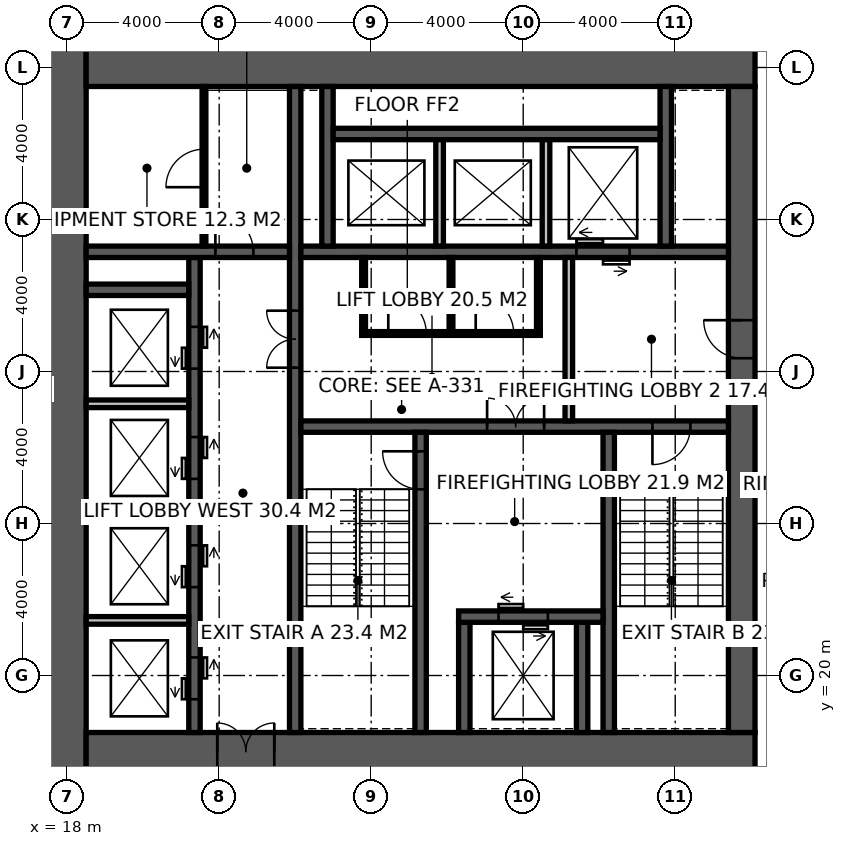
"""IFC4 building model, lengths in metres.
Left out: names, types, materials, properties, quantities, classifications, styles, units other than length and angle.
Written with IfcOpenShell. Run it as: python <this file> out.ifc"""

import sys

from ifc_helpers import new_model, si_unit, direction, frame, frame_2d, origin, place, context, subcontext, project, spatial, rectangle, extrude, element, fill, save


model = new_model("IFC4")
c1 = context("Model", 3, precision=1e-05, world=origin(), true_north=direction((0.0, 1.0)))
c2 = subcontext(c1, "Body", "Model", "MODEL_VIEW")
j1 = project(units=[si_unit("LENGTHUNIT", "METRE"), si_unit("PLANEANGLEUNIT", "RADIAN")], contexts=[c1])
p1 = place(None, origin())
s1 = spatial("IfcSite", under=j1, at=p1, CompositionType="ELEMENT")
p2 = place(p1, origin())
s2 = spatial("IfcBuilding", under=s1, at=p2, CompositionType="ELEMENT")
p3 = place(p2, frame((0.0, 0.0, 175.8)))
s3 = spatial("IfcBuildingStorey", under=s2, at=p3, CompositionType="ELEMENT", Elevation=175.8)
p4 = place(p3, frame((18.0, 17.5, -0.15), z_axis=(0.0, 0.0, 1.0), x_axis=(0.0, 1.0, 0.0)))
e1 = element("IfcWall", 1, at=p4, inside=s3, PredefinedType="SHEAR", context=c2, shape_type="SweptSolid", body=[
    extrude(rectangle(XDim=19.0, YDim=1.0, at=frame_2d((9.5, 0.0))), origin(), (0.0, 0.0, 1.0), 4.0),
])
p5 = place(p3, frame((18.5, 18.0, -0.15), z_axis=(0.0, 0.0, 1.0), x_axis=(1.0, 0.0, 0.0)))
e2 = element("IfcWall", 2, at=p5, inside=s3, PredefinedType="SHEAR", context=c2, shape_type="SweptSolid", body=[
    extrude(rectangle(XDim=17.6, YDim=1.0, at=frame_2d((8.8, 0.0))), origin(), (0.0, 0.0, 1.0), 4.0),
])
p6 = place(p5, frame((3.45, 0.0, 0.15)))
e3 = element("IfcOpeningElement", 3, at=p6, cuts=e2, PredefinedType="OPENING", context=c2, shape_type="SweptSolid", body=[
    extrude(rectangle(XDim=1.5, YDim=2.4, at=frame_2d((0.75, 1.2))), frame((0.0, 0.51, 0.0), z_axis=(0.0, -1.0, 0.0), x_axis=(1.0, 0.0, 0.0)), (0.0, 0.0, 1.0), 1.02),
])
p7 = place(p3, frame((18.5, 36.0, -0.15), z_axis=(0.0, 0.0, 1.0), x_axis=(1.0, 0.0, 0.0)))
e4 = element("IfcWall", 4, at=p7, inside=s3, PredefinedType="SHEAR", context=c2, shape_type="SweptSolid", body=[
    extrude(rectangle(XDim=17.6, YDim=1.0, at=frame_2d((8.8, 0.0))), origin(), (0.0, 0.0, 1.0), 4.0),
])
p8 = place(p3, frame((35.75, 18.5, -0.15), z_axis=(0.0, 0.0, 1.0), x_axis=(0.0, 1.0, 0.0)))
e5 = element("IfcWall", 5, at=p8, inside=s3, PredefinedType="SHEAR", context=c2, shape_type="SweptSolid", body=[
    extrude(rectangle(XDim=17.0, YDim=0.7, at=frame_2d((8.5, 0.0))), origin(), (0.0, 0.0, 1.0), 4.0),
])
p9 = place(p8, frame((9.85, 0.0, 0.15)))
e6 = element("IfcOpeningElement", 6, at=p9, cuts=e5, PredefinedType="OPENING", context=c2, shape_type="SweptSolid", body=[
    extrude(rectangle(XDim=1.0, YDim=2.2, at=frame_2d((0.5, 1.1))), frame((0.0, 0.36, 0.0), z_axis=(0.0, -1.0, 0.0), x_axis=(1.0, 0.0, 0.0)), (0.0, 0.0, 1.0), 0.72),
])
p10 = place(p3, frame((24.0, 18.5, -0.15), z_axis=(0.0, 0.0, 1.0), x_axis=(0.0, 1.0, 0.0)))
e7 = element("IfcWall", 7, at=p10, inside=s3, PredefinedType="SHEAR", context=c2, shape_type="SweptSolid", body=[
    extrude(rectangle(XDim=17.0, YDim=0.3, at=frame_2d((8.5, 0.0))), origin(), (0.0, 0.0, 1.0), 4.0),
])
p11 = place(p10, frame((9.6, 0.0, 0.15)))
e8 = element("IfcOpeningElement", 8, at=p11, cuts=e7, PredefinedType="OPENING", context=c2, shape_type="SweptSolid", body=[
    extrude(rectangle(XDim=1.5, YDim=2.4, at=frame_2d((0.75, 1.2))), frame((0.0, 0.16, 0.0), z_axis=(0.0, -1.0, 0.0), x_axis=(1.0, 0.0, 0.0)), (0.0, 0.0, 1.0), 0.32),
])
p12 = place(p3, frame((24.15, 26.55, -0.15), z_axis=(0.0, 0.0, 1.0), x_axis=(1.0, 0.0, 0.0)))
e9 = element("IfcWall", 9, at=p12, inside=s3, PredefinedType="SHEAR", context=c2, shape_type="SweptSolid", body=[
    extrude(rectangle(XDim=11.25, YDim=0.3, at=frame_2d((5.625, 0.0))), origin(), (0.0, 0.0, 1.0), 4.0),
])
p13 = place(p12, frame((9.25, 0.0, 0.15)))
e10 = element("IfcOpeningElement", 10, at=p13, cuts=e9, PredefinedType="OPENING", context=c2, shape_type="SweptSolid", body=[
    extrude(rectangle(XDim=1.0, YDim=2.2, at=frame_2d((0.5, 1.1))), frame((0.0, 0.16, 0.0), z_axis=(0.0, -1.0, 0.0), x_axis=(1.0, 0.0, 0.0)), (0.0, 0.0, 1.0), 0.32),
])
p14 = place(p12, frame((4.9, 0.0, 0.15)))
e11 = element("IfcOpeningElement", 11, at=p14, cuts=e9, PredefinedType="OPENING", context=c2, shape_type="SweptSolid", body=[
    extrude(rectangle(XDim=1.5, YDim=2.4, at=frame_2d((0.75, 1.2))), frame((0.0, 0.16, 0.0), z_axis=(0.0, -1.0, 0.0), x_axis=(1.0, 0.0, 0.0)), (0.0, 0.0, 1.0), 0.32),
])
p15 = place(p3, frame((27.3, 18.5, -0.15), z_axis=(0.0, 0.0, 1.0), x_axis=(0.0, 1.0, 0.0)))
e12 = element("IfcWall", 12, at=p15, inside=s3, PredefinedType="SHEAR", context=c2, shape_type="SweptSolid", body=[
    extrude(rectangle(XDim=7.9, YDim=0.3, at=frame_2d((3.95, 0.0))), origin(), (0.0, 0.0, 1.0), 4.0),
])
p16 = place(p15, frame((6.4, 0.0, 0.15)))
e13 = element("IfcOpeningElement", 13, at=p16, cuts=e12, PredefinedType="OPENING", context=c2, shape_type="SweptSolid", body=[
    extrude(rectangle(XDim=1.0, YDim=2.2, at=frame_2d((0.5, 1.1))), frame((0.0, 0.16, 0.0), z_axis=(0.0, -1.0, 0.0), x_axis=(1.0, 0.0, 0.0)), (0.0, 0.0, 1.0), 0.32),
])
p17 = place(p3, frame((32.25, 18.5, -0.15), z_axis=(0.0, 0.0, 1.0), x_axis=(0.0, 1.0, 0.0)))
e14 = element("IfcWall", 14, at=p17, inside=s3, PredefinedType="SHEAR", context=c2, shape_type="SweptSolid", body=[
    extrude(rectangle(XDim=7.9, YDim=0.3, at=frame_2d((3.95, 0.0))), origin(), (0.0, 0.0, 1.0), 4.0),
])
for number, where, z_axis, x_axis in (
    (15, (28.45, 18.5, -0.15), (0.0, 0.0, 1.0), (0.0, 1.0, 0.0)),
    (16, (31.55, 18.5, -0.15), (0.0, 0.0, 1.0), (0.0, 1.0, 0.0)),
):
    element("IfcWall", number, at=place(p3, frame(where, z_axis=z_axis, x_axis=x_axis)), inside=s3, PredefinedType="SHEAR", context=c2, shape_type="SweptSolid", body=[
        extrude(rectangle(XDim=2.9, YDim=0.3, at=frame_2d((1.45, 0.0))), origin(), (0.0, 0.0, 1.0), 4.0),
    ])
p18 = place(p3, frame((28.3, 21.55, -0.15), z_axis=(0.0, 0.0, 1.0), x_axis=(1.0, 0.0, 0.0)))
e17 = element("IfcWall", 17, at=p18, inside=s3, PredefinedType="SHEAR", context=c2, shape_type="SweptSolid", body=[
    extrude(rectangle(XDim=3.8, YDim=0.3, at=frame_2d((1.9, 0.0))), origin(), (0.0, 0.0, 1.0), 4.0),
])
p19 = place(p18, frame((1.05, 0.0, 0.15)))
e18 = element("IfcOpeningElement", 18, at=p19, cuts=e17, PredefinedType="OPENING", context=c2, shape_type="SweptSolid", body=[
    extrude(rectangle(XDim=1.3, YDim=2.4, at=frame_2d((0.65, 1.2))), frame((0.0, 0.16, 0.0), z_axis=(0.0, -1.0, 0.0), x_axis=(1.0, 0.0, 0.0)), (0.0, 0.0, 1.0), 0.32),
])
p20 = place(p3, frame((24.15, 31.15, -0.15), z_axis=(0.0, 0.0, 1.0), x_axis=(1.0, 0.0, 0.0)))
e19 = element("IfcWall", 19, at=p20, inside=s3, PredefinedType="SHEAR", context=c2, shape_type="SweptSolid", body=[
    extrude(rectangle(XDim=11.25, YDim=0.3, at=frame_2d((5.625, 0.0))), origin(), (0.0, 0.0, 1.0), 4.0),
])
p21 = place(p20, frame((7.25, 0.0, 0.15)))
e20 = element("IfcOpeningElement", 20, at=p21, cuts=e19, PredefinedType="OPENING", context=c2, shape_type="SweptSolid", body=[
    extrude(rectangle(XDim=1.4, YDim=2.4, at=frame_2d((0.7, 1.2))), frame((0.0, 0.16, 0.0), z_axis=(0.0, -1.0, 0.0), x_axis=(1.0, 0.0, 0.0)), (0.0, 0.0, 1.0), 0.32),
])
p22 = place(p3, frame((21.35, 18.5, -0.15), z_axis=(0.0, 0.0, 1.0), x_axis=(0.0, 1.0, 0.0)))
e21 = element("IfcWall", 21, at=p22, inside=s3, PredefinedType="SHEAR", context=c2, shape_type="SweptSolid", body=[
    extrude(rectangle(XDim=12.5, YDim=0.3, at=frame_2d((6.25, 0.0))), origin(), (0.0, 0.0, 1.0), 4.0),
])
p23 = place(p22, frame((0.875, 0.0, 0.15)))
e22 = element("IfcOpeningElement", 22, at=p23, cuts=e21, PredefinedType="OPENING", context=c2, shape_type="SweptSolid", body=[
    extrude(rectangle(XDim=1.1, YDim=2.2, at=frame_2d((0.55, 1.1))), frame((0.0, 0.16, 0.0), z_axis=(0.0, -1.0, 0.0), x_axis=(1.0, 0.0, 0.0)), (0.0, 0.0, 1.0), 0.32),
])
p24 = place(p22, frame((3.825, 0.0, 0.15)))
e23 = element("IfcOpeningElement", 23, at=p24, cuts=e21, PredefinedType="OPENING", context=c2, shape_type="SweptSolid", body=[
    extrude(rectangle(XDim=1.1, YDim=2.2, at=frame_2d((0.55, 1.1))), frame((0.0, 0.16, 0.0), z_axis=(0.0, -1.0, 0.0), x_axis=(1.0, 0.0, 0.0)), (0.0, 0.0, 1.0), 0.32),
])
p25 = place(p22, frame((6.675, 0.0, 0.15)))
e24 = element("IfcOpeningElement", 24, at=p25, cuts=e21, PredefinedType="OPENING", context=c2, shape_type="SweptSolid", body=[
    extrude(rectangle(XDim=1.1, YDim=2.2, at=frame_2d((0.55, 1.1))), frame((0.0, 0.16, 0.0), z_axis=(0.0, -1.0, 0.0), x_axis=(1.0, 0.0, 0.0)), (0.0, 0.0, 1.0), 0.32),
])
p26 = place(p22, frame((9.575, 0.0, 0.15)))
e25 = element("IfcOpeningElement", 25, at=p26, cuts=e21, PredefinedType="OPENING", context=c2, shape_type="SweptSolid", body=[
    extrude(rectangle(XDim=1.1, YDim=2.2, at=frame_2d((0.55, 1.1))), frame((0.0, 0.16, 0.0), z_axis=(0.0, -1.0, 0.0), x_axis=(1.0, 0.0, 0.0)), (0.0, 0.0, 1.0), 0.32),
])
p27 = place(p3, frame((18.5, 31.15, -0.15), z_axis=(0.0, 0.0, 1.0), x_axis=(1.0, 0.0, 0.0)))
e26 = element("IfcWall", 26, at=p27, inside=s3, PredefinedType="SHEAR", context=c2, shape_type="SweptSolid", body=[
    extrude(rectangle(XDim=5.35, YDim=0.3, at=frame_2d((2.675, 0.0))), origin(), (0.0, 0.0, 1.0), 4.0),
])
p28 = place(p27, frame((3.4, 0.0, 0.15)))
e27 = element("IfcOpeningElement", 27, at=p28, cuts=e26, PredefinedType="OPENING", context=c2, shape_type="SweptSolid", body=[
    extrude(rectangle(XDim=1.0, YDim=2.2, at=frame_2d((0.5, 1.1))), frame((0.0, 0.16, 0.0), z_axis=(0.0, -1.0, 0.0), x_axis=(1.0, 0.0, 0.0)), (0.0, 0.0, 1.0), 0.32),
])
p29 = place(p3, frame((18.5, 30.15, -0.15), z_axis=(0.0, 0.0, 1.0), x_axis=(1.0, 0.0, 0.0)))
e28 = element("IfcWall", 28, at=p29, inside=s3, PredefinedType="SHEAR", context=c2, shape_type="SweptSolid", body=[
    extrude(rectangle(XDim=2.7, YDim=0.3, at=frame_2d((1.35, 0.0))), origin(), (0.0, 0.0, 1.0), 4.0),
])
for number, where, z_axis, x_axis in (
    (29, (24.85, 31.3, -0.15), (0.0, 0.0, 1.0), (0.0, 1.0, 0.0)),
    (30, (33.75, 31.3, -0.15), (0.0, 0.0, 1.0), (0.0, 1.0, 0.0)),
):
    element("IfcWall", number, at=place(p3, frame(where, z_axis=z_axis, x_axis=x_axis)), inside=s3, PredefinedType="SHEAR", context=c2, shape_type="SweptSolid", body=[
        extrude(rectangle(XDim=4.2, YDim=0.3, at=frame_2d((2.1, 0.0))), origin(), (0.0, 0.0, 1.0), 4.0),
    ])
p30 = place(p3, frame((25.0, 34.25, -0.15), z_axis=(0.0, 0.0, 1.0), x_axis=(1.0, 0.0, 0.0)))
e31 = element("IfcWall", 31, at=p30, inside=s3, PredefinedType="SHEAR", context=c2, shape_type="SweptSolid", body=[
    extrude(rectangle(XDim=8.6, YDim=0.3, at=frame_2d((4.3, 0.0))), origin(), (0.0, 0.0, 1.0), 4.0),
])
for number, where, z_axis, x_axis in (
    (32, (27.8, 31.3, -0.15), (0.0, 0.0, 1.0), (0.0, 1.0, 0.0)),
    (33, (30.6, 31.3, -0.15), (0.0, 0.0, 1.0), (0.0, 1.0, 0.0)),
):
    element("IfcWall", number, at=place(p3, frame(where, z_axis=z_axis, x_axis=x_axis)), inside=s3, PredefinedType="SOLIDWALL", context=c2, shape_type="SweptSolid", body=[
        extrude(rectangle(XDim=2.8, YDim=0.2, at=frame_2d((1.4, 0.0))), origin(), (0.0, 0.0, 1.0), 4.0),
    ])
for number, where, z_axis, x_axis in (
    (34, (18.5, 21.45, -0.15), (0.0, 0.0, 1.0), (1.0, 0.0, 0.0)),
    (35, (18.5, 24.3, -0.15), (0.0, 0.0, 1.0), (1.0, 0.0, 0.0)),
    (36, (18.5, 27.15, -0.15), (0.0, 0.0, 1.0), (1.0, 0.0, 0.0)),
):
    element("IfcWall", number, at=place(p3, frame(where, z_axis=z_axis, x_axis=x_axis)), inside=s3, PredefinedType="SOLIDWALL", context=c2, shape_type="SweptSolid", body=[
        extrude(rectangle(XDim=2.7, YDim=0.2, at=frame_2d((1.35, 0.0))), origin(), (0.0, 0.0, 1.0), 4.0),
    ])
p31 = place(p3, frame((31.2, 26.7, 0.0), z_axis=(0.0, 0.0, 1.0), x_axis=(0.0, 1.0, 0.0)))
e37 = element("IfcWall", 37, at=p31, inside=s3, PredefinedType="SOLIDWALL", context=c2, shape_type="SweptSolid", body=[
    extrude(rectangle(XDim=4.3, YDim=0.2, at=frame_2d((2.15, 0.0))), origin(), (0.0, 0.0, 1.0), 3.85),
])
p32 = place(p3, frame((21.6, 31.3, 0.0), z_axis=(0.0, 0.0, 1.0), x_axis=(0.0, 1.0, 0.0)))
e38 = element("IfcWall", 38, at=p32, inside=s3, PredefinedType="PARTITIONING", context=c2, shape_type="SweptSolid", body=[
    extrude(rectangle(XDim=4.2, YDim=0.1, at=frame_2d((2.1, 0.0))), origin(), (0.0, 0.0, 1.0), 3.85),
])
p33 = place(p32, frame((1.55, 0.0, 0.0)))
e39 = element("IfcOpeningElement", 39, at=p33, cuts=e38, PredefinedType="OPENING", context=c2, shape_type="SweptSolid", body=[
    extrude(rectangle(XDim=1.0, YDim=2.2, at=frame_2d((0.5, 1.1))), frame((0.0, 0.06, 0.0), z_axis=(0.0, -1.0, 0.0), x_axis=(1.0, 0.0, 0.0)), (0.0, 0.0, 1.0), 0.12),
])
p34 = place(p3, frame((25.75, 29.0, 0.0), z_axis=(0.0, 0.0, 1.0), x_axis=(1.0, 0.0, 0.0)))
e40 = element("IfcWall", 40, at=p34, inside=s3, PredefinedType="PARTITIONING", context=c2, shape_type="SweptSolid", body=[
    extrude(rectangle(XDim=4.7, YDim=0.1, at=frame_2d((2.35, 0.0))), origin(), (0.0, 0.0, 1.0), 3.85),
])
p35 = place(p34, frame((0.7, 0.0, 0.0)))
e41 = element("IfcOpeningElement", 41, at=p35, cuts=e40, PredefinedType="OPENING", context=c2, shape_type="SweptSolid", body=[
    extrude(rectangle(XDim=1.0, YDim=2.2, at=frame_2d((0.5, 1.1))), frame((0.0, 0.06, 0.0), z_axis=(0.0, -1.0, 0.0), x_axis=(1.0, 0.0, 0.0)), (0.0, 0.0, 1.0), 0.12),
])
p36 = place(p34, frame((3.0, 0.0, 0.0)))
e42 = element("IfcOpeningElement", 42, at=p36, cuts=e40, PredefinedType="OPENING", context=c2, shape_type="SweptSolid", body=[
    extrude(rectangle(XDim=1.0, YDim=2.2, at=frame_2d((0.5, 1.1))), frame((0.0, 0.06, 0.0), z_axis=(0.0, -1.0, 0.0), x_axis=(1.0, 0.0, 0.0)), (0.0, 0.0, 1.0), 0.12),
])
for number, where, z_axis, x_axis in (
    (43, (25.8, 29.05, 0.0), (0.0, 0.0, 1.0), (0.0, 1.0, 0.0)),
    (44, (30.4, 29.05, 0.0), (0.0, 0.0, 1.0), (0.0, 1.0, 0.0)),
    (45, (28.1, 29.05, 0.0), (0.0, 0.0, 1.0), (0.0, 1.0, 0.0)),
):
    element("IfcWall", number, at=place(p3, frame(where, z_axis=z_axis, x_axis=x_axis)), inside=s3, PredefinedType="PARTITIONING", context=c2, shape_type="SweptSolid", body=[
        extrude(rectangle(XDim=1.95, YDim=0.1, at=frame_2d((0.975, 0.0))), origin(), (0.0, 0.0, 1.0), 3.85),
    ])
p37 = place(p16, origin())
e46 = element("IfcDoor", 46, at=p37, inside=s3, OperationType="SINGLE_SWING_RIGHT", PredefinedType="DOOR", context=c2, shape_type="SweptSolid", body=[
    extrude(rectangle(XDim=1.0, YDim=2.2, at=frame_2d((0.5, 1.1))), frame((0.0, 0.025, 0.0), z_axis=(0.0, -1.0, 0.0), x_axis=(1.0, 0.0, 0.0)), (0.0, 0.0, 1.0), 0.05),
])
fill(e13, e46)
p38 = place(p13, frame((1.0, 0.0, 0.0), z_axis=(0.0, 0.0, 1.0), x_axis=(-1.0, 0.0, 0.0)))
e47 = element("IfcDoor", 47, at=p38, inside=s3, OperationType="SINGLE_SWING_RIGHT", PredefinedType="DOOR", context=c2, shape_type="SweptSolid", body=[
    extrude(rectangle(XDim=1.0, YDim=2.2, at=frame_2d((0.5, 1.1))), frame((0.0, 0.025, 0.0), z_axis=(0.0, -1.0, 0.0), x_axis=(1.0, 0.0, 0.0)), (0.0, 0.0, 1.0), 0.05),
])
fill(e10, e47)
p39 = place(p9, origin())
e48 = element("IfcDoor", 48, at=p39, inside=s3, OperationType="SINGLE_SWING_RIGHT", PredefinedType="DOOR", context=c2, shape_type="SweptSolid", body=[
    extrude(rectangle(XDim=1.0, YDim=2.2, at=frame_2d((0.5, 1.1))), frame((0.0, 0.025, 0.0), z_axis=(0.0, -1.0, 0.0), x_axis=(1.0, 0.0, 0.0)), (0.0, 0.0, 1.0), 0.05),
])
fill(e6, e48)
p40 = place(p14, origin())
e49 = element("IfcDoor", 49, at=p40, inside=s3, OperationType="DOUBLE_DOOR_DOUBLE_SWING", PredefinedType="DOOR", context=c2, shape_type="SweptSolid", body=[
    extrude(rectangle(XDim=1.5, YDim=2.4, at=frame_2d((0.75, 1.2))), frame((0.0, 0.025, 0.0), z_axis=(0.0, -1.0, 0.0), x_axis=(1.0, 0.0, 0.0)), (0.0, 0.0, 1.0), 0.05),
])
fill(e11, e49)
p41 = place(p11, origin())
e50 = element("IfcDoor", 50, at=p41, inside=s3, OperationType="DOUBLE_DOOR_DOUBLE_SWING", PredefinedType="DOOR", context=c2, shape_type="SweptSolid", body=[
    extrude(rectangle(XDim=1.5, YDim=2.4, at=frame_2d((0.75, 1.2))), frame((0.0, 0.025, 0.0), z_axis=(0.0, -1.0, 0.0), x_axis=(1.0, 0.0, 0.0)), (0.0, 0.0, 1.0), 0.05),
])
fill(e8, e50)
p42 = place(p28, origin())
e51 = element("IfcDoor", 51, at=p42, inside=s3, OperationType="SINGLE_SWING_LEFT", PredefinedType="DOOR", context=c2, shape_type="SweptSolid", body=[
    extrude(rectangle(XDim=1.0, YDim=2.2, at=frame_2d((0.5, 1.1))), frame((0.0, 0.025, 0.0), z_axis=(0.0, -1.0, 0.0), x_axis=(1.0, 0.0, 0.0)), (0.0, 0.0, 1.0), 0.05),
])
fill(e27, e51)
p43 = place(p33, origin())
e52 = element("IfcDoor", 52, at=p43, inside=s3, OperationType="SINGLE_SWING_LEFT", PredefinedType="DOOR", context=c2, shape_type="SweptSolid", body=[
    extrude(rectangle(XDim=1.0, YDim=2.2, at=frame_2d((0.5, 1.1))), frame((0.0, 0.025, 0.0), z_axis=(0.0, -1.0, 0.0), x_axis=(1.0, 0.0, 0.0)), (0.0, 0.0, 1.0), 0.05),
])
fill(e39, e52)
p44 = place(p35, origin())
e53 = element("IfcDoor", 53, at=p44, inside=s3, OperationType="SINGLE_SWING_LEFT", PredefinedType="DOOR", context=c2, shape_type="SweptSolid", body=[
    extrude(rectangle(XDim=1.0, YDim=2.2, at=frame_2d((0.5, 1.1))), frame((0.0, 0.025, 0.0), z_axis=(0.0, -1.0, 0.0), x_axis=(1.0, 0.0, 0.0)), (0.0, 0.0, 1.0), 0.05),
])
fill(e41, e53)
p45 = place(p36, origin())
e54 = element("IfcDoor", 54, at=p45, inside=s3, OperationType="SINGLE_SWING_LEFT", PredefinedType="DOOR", context=c2, shape_type="SweptSolid", body=[
    extrude(rectangle(XDim=1.0, YDim=2.2, at=frame_2d((0.5, 1.1))), frame((0.0, 0.025, 0.0), z_axis=(0.0, -1.0, 0.0), x_axis=(1.0, 0.0, 0.0)), (0.0, 0.0, 1.0), 0.05),
])
fill(e42, e54)
p46 = place(p6, origin())
e55 = element("IfcDoor", 55, at=p46, inside=s3, OperationType="DOUBLE_DOOR_DOUBLE_SWING", PredefinedType="DOOR", context=c2, shape_type="SweptSolid", body=[
    extrude(rectangle(XDim=1.5, YDim=2.4, at=frame_2d((0.75, 1.2))), frame((0.0, 0.025, 0.0), z_axis=(0.0, -1.0, 0.0), x_axis=(1.0, 0.0, 0.0)), (0.0, 0.0, 1.0), 0.05),
])
fill(e3, e55)
p47 = place(p19, origin())
e56 = element("IfcDoor", 56, at=p47, inside=s3, OperationType="DOUBLE_DOOR_SLIDING", PredefinedType="DOOR", context=c2, shape_type="SweptSolid", body=[
    extrude(rectangle(XDim=1.3, YDim=2.4, at=frame_2d((0.65, 1.2))), frame((0.0, 0.025, 0.0), z_axis=(0.0, -1.0, 0.0), x_axis=(1.0, 0.0, 0.0)), (0.0, 0.0, 1.0), 0.05),
])
fill(e18, e56)
p48 = place(p21, origin())
e57 = element("IfcDoor", 57, at=p48, inside=s3, OperationType="DOUBLE_DOOR_SLIDING", PredefinedType="DOOR", context=c2, shape_type="SweptSolid", body=[
    extrude(rectangle(XDim=1.4, YDim=2.4, at=frame_2d((0.7, 1.2))), frame((0.0, 0.025, 0.0), z_axis=(0.0, -1.0, 0.0), x_axis=(1.0, 0.0, 0.0)), (0.0, 0.0, 1.0), 0.05),
])
fill(e20, e57)
p49 = place(p23, origin())
e58 = element("IfcDoor", 58, at=p49, inside=s3, OperationType="DOUBLE_DOOR_SLIDING", PredefinedType="DOOR", context=c2, shape_type="SweptSolid", body=[
    extrude(rectangle(XDim=1.1, YDim=2.2, at=frame_2d((0.55, 1.1))), frame((0.0, 0.025, 0.0), z_axis=(0.0, -1.0, 0.0), x_axis=(1.0, 0.0, 0.0)), (0.0, 0.0, 1.0), 0.05),
])
fill(e22, e58)
p50 = place(p24, origin())
e59 = element("IfcDoor", 59, at=p50, inside=s3, OperationType="DOUBLE_DOOR_SLIDING", PredefinedType="DOOR", context=c2, shape_type="SweptSolid", body=[
    extrude(rectangle(XDim=1.1, YDim=2.2, at=frame_2d((0.55, 1.1))), frame((0.0, 0.025, 0.0), z_axis=(0.0, -1.0, 0.0), x_axis=(1.0, 0.0, 0.0)), (0.0, 0.0, 1.0), 0.05),
])
fill(e23, e59)
p51 = place(p25, origin())
e60 = element("IfcDoor", 60, at=p51, inside=s3, OperationType="DOUBLE_DOOR_SLIDING", PredefinedType="DOOR", context=c2, shape_type="SweptSolid", body=[
    extrude(rectangle(XDim=1.1, YDim=2.2, at=frame_2d((0.55, 1.1))), frame((0.0, 0.025, 0.0), z_axis=(0.0, -1.0, 0.0), x_axis=(1.0, 0.0, 0.0)), (0.0, 0.0, 1.0), 0.05),
])
fill(e24, e60)
p52 = place(p26, origin())
e61 = element("IfcDoor", 61, at=p52, inside=s3, OperationType="DOUBLE_DOOR_SLIDING", PredefinedType="DOOR", context=c2, shape_type="SweptSolid", body=[
    extrude(rectangle(XDim=1.1, YDim=2.2, at=frame_2d((0.55, 1.1))), frame((0.0, 0.025, 0.0), z_axis=(0.0, -1.0, 0.0), x_axis=(1.0, 0.0, 0.0)), (0.0, 0.0, 1.0), 0.05),
])
fill(e25, e61)
save(model, sys.argv[1])
